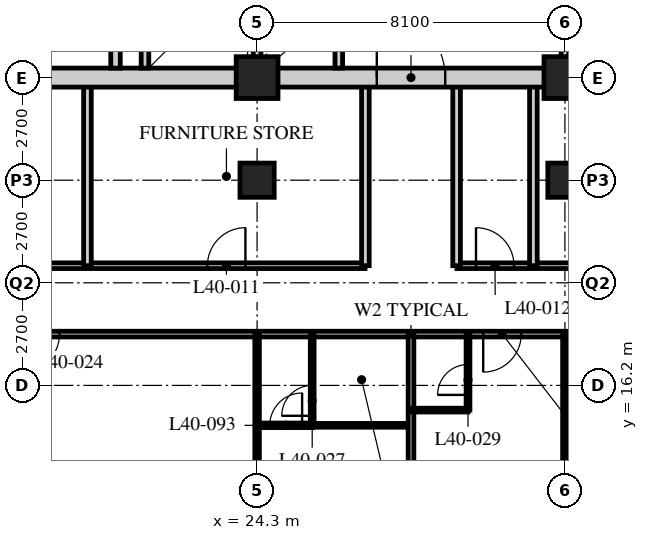
"""IFC4 building model, lengths in metres.
Left out: names, types, materials, properties, quantities, classifications, styles, units other than length and angle.
Written with IfcOpenShell. Run it as: python <this file> out.ifc"""

import sys

from ifc_helpers import new_model, si_unit, direction, frame, frame_2d, origin, origin_2d, place, context, subcontext, project, spatial, rectangle, hollow_rectangle, extrude, element, fill, save


model = new_model("IFC4")
c1 = context("Model", 3, precision=1e-05, world=origin(), true_north=direction((0.0, 1.0)))
c2 = subcontext(c1, "Body", "Model", "MODEL_VIEW")
j1 = project(units=[si_unit("LENGTHUNIT", "METRE"), si_unit("PLANEANGLEUNIT", "RADIAN")], contexts=[c1])
p1 = place(None, origin())
s1 = spatial("IfcSite", under=j1, at=p1, CompositionType="ELEMENT")
p2 = place(p1, origin())
s2 = spatial("IfcBuilding", under=s1, at=p2, CompositionType="ELEMENT")
p3 = place(p2, frame((0.0, 0.0, 154.4)))
s3 = spatial("IfcBuildingStorey", under=s2, at=p3, CompositionType="ELEMENT", Elevation=154.4)
p4 = place(p3, frame((24.3, 21.6, 0.0), z_axis=(0.0, 0.0, 1.0), x_axis=(1.0, 0.0, 0.0)))
e1 = element("IfcColumn", 1, at=p4, inside=s3, PredefinedType="COLUMN", context=c2, shape_type="SweptSolid", body=[
    extrude(hollow_rectangle(XDim=0.9, YDim=0.9, WallThickness=0.1, at=origin_2d()), origin(), (0.0, 0.0, 1.0), 3.4),
])
p5 = place(p3, frame((24.3, 24.3, 0.0), z_axis=(0.0, 0.0, 1.0), x_axis=(1.0, 0.0, 0.0)))
e2 = element("IfcColumn", 2, at=p5, inside=s3, PredefinedType="COLUMN", context=c2, shape_type="SweptSolid", body=[
    extrude(hollow_rectangle(XDim=1.1, YDim=1.1, WallThickness=0.1, at=origin_2d()), origin(), (0.0, 0.0, 1.0), 3.4),
])
p6 = place(p3, frame((32.4, 21.6, 0.0), z_axis=(0.0, 0.0, 1.0), x_axis=(1.0, 0.0, 0.0)))
e3 = element("IfcColumn", 3, at=p6, inside=s3, PredefinedType="COLUMN", context=c2, shape_type="SweptSolid", body=[
    extrude(hollow_rectangle(XDim=0.9, YDim=0.9, WallThickness=0.1, at=origin_2d()), origin(), (0.0, 0.0, 1.0), 3.4),
])
p7 = place(p3, frame((32.4, 24.3, 0.0), z_axis=(0.0, 0.0, 1.0), x_axis=(1.0, 0.0, 0.0)))
e4 = element("IfcColumn", 4, at=p7, inside=s3, PredefinedType="COLUMN", context=c2, shape_type="SweptSolid", body=[
    extrude(hollow_rectangle(XDim=1.1, YDim=1.1, WallThickness=0.1, at=origin_2d()), origin(), (0.0, 0.0, 1.0), 3.4),
])
p8 = place(p3, frame((8.1, 17.55, 0.0), z_axis=(0.0, 0.0, 1.0), x_axis=(1.0, 0.0, 0.0)))
e5 = element("IfcWall", 5, at=p8, inside=s3, PredefinedType="PARTITIONING", context=c2, shape_type="SweptSolid", body=[
    extrude(rectangle(XDim=40.5, YDim=0.15, at=frame_2d((20.25, 0.0))), origin(), (0.0, 0.0, 1.0), 3.15),
])
p9 = place(p8, frame((10.0, 0.0, 0.0)))
e6 = element("IfcOpeningElement", 6, at=p9, cuts=e5, PredefinedType="OPENING", context=c2, shape_type="SweptSolid", body=[
    extrude(rectangle(XDim=1.0, YDim=2.1, at=frame_2d((0.5, 1.05))), frame((0.0, 0.085, 0.0), z_axis=(0.0, -1.0, 0.0), x_axis=(1.0, 0.0, 0.0)), (0.0, 0.0, 1.0), 0.17),
])
p10 = place(p8, frame((22.15, 0.0, 0.0)))
e7 = element("IfcOpeningElement", 7, at=p10, cuts=e5, PredefinedType="OPENING", context=c2, shape_type="SweptSolid", body=[
    extrude(rectangle(XDim=1.0, YDim=2.1, at=frame_2d((0.5, 1.05))), frame((0.0, 0.085, 0.0), z_axis=(0.0, -1.0, 0.0), x_axis=(1.0, 0.0, 0.0)), (0.0, 0.0, 1.0), 0.17),
])
p11 = place(p8, frame((30.8, 0.0, 0.0)))
e8 = element("IfcOpeningElement", 8, at=p11, cuts=e5, PredefinedType="OPENING", context=c2, shape_type="SweptSolid", body=[
    extrude(rectangle(XDim=1.0, YDim=2.1, at=frame_2d((0.5, 1.05))), frame((0.0, 0.085, 0.0), z_axis=(0.0, -1.0, 0.0), x_axis=(1.0, 0.0, 0.0)), (0.0, 0.0, 1.0), 0.17),
])
p12 = place(p8, frame((34.85, 0.0, 0.0)))
e9 = element("IfcOpeningElement", 9, at=p12, cuts=e5, PredefinedType="OPENING", context=c2, shape_type="SweptSolid", body=[
    extrude(rectangle(XDim=1.0, YDim=2.1, at=frame_2d((0.5, 1.05))), frame((0.0, 0.085, 0.0), z_axis=(0.0, -1.0, 0.0), x_axis=(1.0, 0.0, 0.0)), (0.0, 0.0, 1.0), 0.17),
])
p13 = place(p8, frame((1.525, 0.0, 0.0)))
e10 = element("IfcOpeningElement", 10, at=p13, cuts=e5, PredefinedType="OPENING", context=c2, shape_type="SweptSolid", body=[
    extrude(rectangle(XDim=1.0, YDim=2.1, at=frame_2d((0.5, 1.05))), frame((0.0, 0.085, 0.0), z_axis=(0.0, -1.0, 0.0), x_axis=(1.0, 0.0, 0.0)), (0.0, 0.0, 1.0), 0.17),
])
p14 = place(p8, frame((37.975, 0.0, 0.0)))
e11 = element("IfcOpeningElement", 11, at=p14, cuts=e5, PredefinedType="OPENING", context=c2, shape_type="SweptSolid", body=[
    extrude(rectangle(XDim=1.0, YDim=2.1, at=frame_2d((0.5, 1.05))), frame((0.0, 0.085, 0.0), z_axis=(0.0, -1.0, 0.0), x_axis=(1.0, 0.0, 0.0)), (0.0, 0.0, 1.0), 0.17),
])
p15 = place(p3, frame((9.9, 19.35, 0.0), z_axis=(0.0, 0.0, 1.0), x_axis=(1.0, 0.0, 0.0)))
e12 = element("IfcWall", 12, at=p15, inside=s3, PredefinedType="PARTITIONING", context=c2, shape_type="SweptSolid", body=[
    extrude(rectangle(XDim=17.24, YDim=0.15, at=frame_2d((8.62, 0.0))), origin(), (0.0, 0.0, 1.0), 3.15),
])
p16 = place(p15, frame((0.51, 0.0, 0.0)))
e13 = element("IfcOpeningElement", 13, at=p16, cuts=e12, PredefinedType="OPENING", context=c2, shape_type="SweptSolid", body=[
    extrude(rectangle(XDim=1.0, YDim=2.1, at=frame_2d((0.5, 1.05))), frame((0.0, 0.085, 0.0), z_axis=(0.0, -1.0, 0.0), x_axis=(1.0, 0.0, 0.0)), (0.0, 0.0, 1.0), 0.17),
])
p17 = place(p15, frame((3.66, 0.0, 0.0)))
e14 = element("IfcOpeningElement", 14, at=p17, cuts=e12, PredefinedType="OPENING", context=c2, shape_type="SweptSolid", body=[
    extrude(rectangle(XDim=1.0, YDim=2.1, at=frame_2d((0.5, 1.05))), frame((0.0, 0.085, 0.0), z_axis=(0.0, -1.0, 0.0), x_axis=(1.0, 0.0, 0.0)), (0.0, 0.0, 1.0), 0.17),
])
p18 = place(p15, frame((7.618, 0.0, 0.0)))
e15 = element("IfcOpeningElement", 15, at=p18, cuts=e12, PredefinedType="OPENING", context=c2, shape_type="SweptSolid", body=[
    extrude(rectangle(XDim=1.0, YDim=2.1, at=frame_2d((0.5, 1.05))), frame((0.0, 0.085, 0.0), z_axis=(0.0, -1.0, 0.0), x_axis=(1.0, 0.0, 0.0)), (0.0, 0.0, 1.0), 0.17),
])
p19 = place(p15, frame((13.093, 0.0, 0.0)))
e16 = element("IfcOpeningElement", 16, at=p19, cuts=e12, PredefinedType="OPENING", context=c2, shape_type="SweptSolid", body=[
    extrude(rectangle(XDim=1.0, YDim=2.1, at=frame_2d((0.5, 1.05))), frame((0.0, 0.085, 0.0), z_axis=(0.0, -1.0, 0.0), x_axis=(1.0, 0.0, 0.0)), (0.0, 0.0, 1.0), 0.17),
])
p20 = place(p3, frame((29.56, 19.35, 0.0), z_axis=(0.0, 0.0, 1.0), x_axis=(1.0, 0.0, 0.0)))
e17 = element("IfcWall", 17, at=p20, inside=s3, PredefinedType="PARTITIONING", context=c2, shape_type="SweptSolid", body=[
    extrude(rectangle(XDim=17.24, YDim=0.15, at=frame_2d((8.62, 0.0))), origin(), (0.0, 0.0, 1.0), 3.15),
])
p21 = place(p20, frame((0.5, 0.0, 0.0)))
e18 = element("IfcOpeningElement", 18, at=p21, cuts=e17, PredefinedType="OPENING", context=c2, shape_type="SweptSolid", body=[
    extrude(rectangle(XDim=1.0, YDim=2.1, at=frame_2d((0.5, 1.05))), frame((0.0, 0.085, 0.0), z_axis=(0.0, -1.0, 0.0), x_axis=(1.0, 0.0, 0.0)), (0.0, 0.0, 1.0), 0.17),
])
p22 = place(p20, frame((5.975, 0.0, 0.0)))
e19 = element("IfcOpeningElement", 19, at=p22, cuts=e17, PredefinedType="OPENING", context=c2, shape_type="SweptSolid", body=[
    extrude(rectangle(XDim=1.0, YDim=2.1, at=frame_2d((0.5, 1.05))), frame((0.0, 0.085, 0.0), z_axis=(0.0, -1.0, 0.0), x_axis=(1.0, 0.0, 0.0)), (0.0, 0.0, 1.0), 0.17),
])
p23 = place(p20, frame((12.258, 0.0, 0.0)))
e20 = element("IfcOpeningElement", 20, at=p23, cuts=e17, PredefinedType="OPENING", context=c2, shape_type="SweptSolid", body=[
    extrude(rectangle(XDim=1.0, YDim=2.1, at=frame_2d((0.5, 1.05))), frame((0.0, 0.085, 0.0), z_axis=(0.0, -1.0, 0.0), x_axis=(1.0, 0.0, 0.0)), (0.0, 0.0, 1.0), 0.17),
])
p24 = place(p20, frame((15.408, 0.0, 0.0)))
e21 = element("IfcOpeningElement", 21, at=p24, cuts=e17, PredefinedType="OPENING", context=c2, shape_type="SweptSolid", body=[
    extrude(rectangle(XDim=1.0, YDim=2.1, at=frame_2d((0.5, 1.05))), frame((0.0, 0.085, 0.0), z_axis=(0.0, -1.0, 0.0), x_axis=(1.0, 0.0, 0.0)), (0.0, 0.0, 1.0), 0.17),
])
for number, where, z_axis, x_axis in (
    (22, (19.836, 19.35, 0.0), (0.0, 0.0, 1.0), (0.0, 1.0, 0.0)),
    (23, (31.57, 19.35, 0.0), (0.0, 0.0, 1.0), (0.0, 1.0, 0.0)),
    (24, (27.15, 19.35, 0.0), (0.0, 0.0, 1.0), (0.0, 1.0, 0.0)),
    (25, (29.55, 19.35, 0.0), (0.0, 0.0, 1.0), (0.0, 1.0, 0.0)),
):
    element("IfcWall", number, at=place(p3, frame(where, z_axis=z_axis, x_axis=x_axis)), inside=s3, PredefinedType="SOLIDWALL", context=c2, shape_type="SweptSolid", body=[
        extrude(rectangle(XDim=4.95, YDim=0.2, at=frame_2d((2.475, 0.0))), origin(), (0.0, 0.0, 1.0), 3.15),
    ])
p25 = place(p3, frame((25.75, 15.15, 0.0), z_axis=(0.0, 0.0, 1.0), x_axis=(1.0, 0.0, 0.0)))
e26 = element("IfcWall", 26, at=p25, inside=s3, PredefinedType="PARTITIONING", context=c2, shape_type="SweptSolid", body=[
    extrude(rectangle(XDim=2.6, YDim=0.1, at=frame_2d((1.3, 0.0))), origin(), (0.0, 0.0, 1.0), 3.15),
])
p26 = place(p3, frame((25.75, 17.55, 0.0), z_axis=(0.0, 0.0, 1.0), x_axis=(0.0, -1.0, 0.0)))
e27 = element("IfcWall", 27, at=p26, inside=s3, PredefinedType="PARTITIONING", context=c2, shape_type="SweptSolid", body=[
    extrude(rectangle(XDim=2.4, YDim=0.1, at=frame_2d((1.2, 0.0))), origin(), (0.0, 0.0, 1.0), 3.15),
])
p27 = place(p26, frame((1.35, 0.0, 0.0)))
e28 = element("IfcOpeningElement", 28, at=p27, cuts=e27, PredefinedType="OPENING", context=c2, shape_type="SweptSolid", body=[
    extrude(rectangle(XDim=0.8, YDim=2.1, at=frame_2d((0.4, 1.05))), frame((0.0, 0.06, 0.0), z_axis=(0.0, -1.0, 0.0), x_axis=(1.0, 0.0, 0.0)), (0.0, 0.0, 1.0), 0.12),
])
p28 = place(p3, frame((24.3, 17.55, 0.0), z_axis=(0.0, 0.0, 1.0), x_axis=(0.0, -1.0, 0.0)))
e29 = element("IfcWall", 29, at=p28, inside=s3, PredefinedType="PARTITIONING", context=c2, shape_type="SweptSolid", body=[
    extrude(rectangle(XDim=11.85, YDim=0.12, at=frame_2d((5.925, 0.0))), origin(), (0.0, 0.0, 1.0), 2.15),
])
p29 = place(p28, frame((6.85, 0.0, 0.0)))
e30 = element("IfcOpeningElement", 30, at=p29, cuts=e29, PredefinedType="OPENING", context=c2, shape_type="SweptSolid", body=[
    extrude(rectangle(XDim=0.85, YDim=2.1, at=frame_2d((0.425, 1.05))), frame((0.0, 0.07, 0.0), z_axis=(0.0, -1.0, 0.0), x_axis=(1.0, 0.0, 0.0)), (0.0, 0.0, 1.0), 0.14),
])
p30 = place(p3, frame((28.35, 17.55, 0.0), z_axis=(0.0, 0.0, 1.0), x_axis=(0.0, -1.0, 0.0)))
e31 = element("IfcWall", 31, at=p30, inside=s3, PredefinedType="PARTITIONING", context=c2, shape_type="SweptSolid", body=[
    extrude(rectangle(XDim=11.85, YDim=0.15, at=frame_2d((5.925, 0.0))), origin(), (0.0, 0.0, 1.0), 3.15),
])
p31 = place(p3, frame((28.35, 15.55, 0.0), z_axis=(0.0, 0.0, 1.0), x_axis=(1.0, 0.0, 0.0)))
e32 = element("IfcWall", 32, at=p31, inside=s3, PredefinedType="PARTITIONING", context=c2, shape_type="SweptSolid", body=[
    extrude(rectangle(XDim=1.5, YDim=0.1, at=frame_2d((0.75, 0.0))), origin(), (0.0, 0.0, 1.0), 3.15),
])
p32 = place(p3, frame((29.85, 17.55, 0.0), z_axis=(0.0, 0.0, 1.0), x_axis=(0.0, -1.0, 0.0)))
e33 = element("IfcWall", 33, at=p32, inside=s3, PredefinedType="PARTITIONING", context=c2, shape_type="SweptSolid", body=[
    extrude(rectangle(XDim=2.0, YDim=0.1, at=frame_2d((1.0, 0.0))), origin(), (0.0, 0.0, 1.0), 3.15),
])
p33 = place(p32, frame((0.8, 0.0, 0.0)))
e34 = element("IfcOpeningElement", 34, at=p33, cuts=e33, PredefinedType="OPENING", context=c2, shape_type="SweptSolid", body=[
    extrude(rectangle(XDim=0.8, YDim=2.1, at=frame_2d((0.4, 1.05))), frame((0.0, 0.06, 0.0), z_axis=(0.0, -1.0, 0.0), x_axis=(1.0, 0.0, 0.0)), (0.0, 0.0, 1.0), 0.12),
])
p34 = place(p3, frame((32.4, 17.55, 0.0), z_axis=(0.0, 0.0, 1.0), x_axis=(0.0, -1.0, 0.0)))
e35 = element("IfcWall", 35, at=p34, inside=s3, PredefinedType="PARTITIONING", context=c2, shape_type="SweptSolid", body=[
    extrude(rectangle(XDim=11.85, YDim=0.12, at=frame_2d((5.925, 0.0))), origin(), (0.0, 0.0, 1.0), 2.15),
])
p35 = place(p34, frame((6.85, 0.0, 0.0)))
e36 = element("IfcOpeningElement", 36, at=p35, cuts=e35, PredefinedType="OPENING", context=c2, shape_type="SweptSolid", body=[
    extrude(rectangle(XDim=0.85, YDim=2.1, at=frame_2d((0.425, 1.05))), frame((0.0, 0.07, 0.0), z_axis=(0.0, -1.0, 0.0), x_axis=(1.0, 0.0, 0.0)), (0.0, 0.0, 1.0), 0.14),
])
p36 = place(p3, frame((25.76, 15.15, 0.0), z_axis=(0.0, 0.0, 1.0), x_axis=(-1.0, 0.0, 0.0)))
e37 = element("IfcWall", 37, at=p36, inside=s3, PredefinedType="PARTITIONING", context=c2, shape_type="SweptSolid", body=[
    extrude(rectangle(XDim=1.46, YDim=0.12, at=frame_2d((0.73, 0.0))), origin(), (0.0, 0.0, 1.0), 3.15),
])
p37 = place(p36, frame((0.275, 0.0, 0.0)))
e38 = element("IfcOpeningElement", 38, at=p37, cuts=e37, PredefinedType="OPENING", context=c2, shape_type="SweptSolid", body=[
    extrude(rectangle(XDim=0.85, YDim=2.1, at=frame_2d((0.425, 1.05))), frame((0.0, 0.07, 0.0), z_axis=(0.0, -1.0, 0.0), x_axis=(1.0, 0.0, 0.0)), (0.0, 0.0, 1.0), 0.14),
])
p38 = place(p3, frame((33.86, 15.15, 0.0), z_axis=(0.0, 0.0, 1.0), x_axis=(-1.0, 0.0, 0.0)))
e39 = element("IfcWall", 39, at=p38, inside=s3, PredefinedType="PARTITIONING", context=c2, shape_type="SweptSolid", body=[
    extrude(rectangle(XDim=1.46, YDim=0.12, at=frame_2d((0.73, 0.0))), origin(), (0.0, 0.0, 1.0), 3.15),
])
p39 = place(p38, frame((0.275, 0.0, 0.0)))
e40 = element("IfcOpeningElement", 40, at=p39, cuts=e39, PredefinedType="OPENING", context=c2, shape_type="SweptSolid", body=[
    extrude(rectangle(XDim=0.85, YDim=2.1, at=frame_2d((0.425, 1.05))), frame((0.0, 0.07, 0.0), z_axis=(0.0, -1.0, 0.0), x_axis=(1.0, 0.0, 0.0)), (0.0, 0.0, 1.0), 0.14),
])
p40 = place(p3, frame((15.95, 24.3, 0.0), z_axis=(0.0, 0.0, 1.0), x_axis=(1.0, 0.0, 0.0)))
e41 = element("IfcWall", 41, at=p40, inside=s3, PredefinedType="SOLIDWALL", context=c2, shape_type="SweptSolid", body=[
    extrude(rectangle(XDim=8.35, YDim=0.5, at=frame_2d((4.175, 0.0))), origin(), (0.0, 0.0, 1.0), 2.38),
])
p41 = place(p3, frame((24.3, 24.3, 0.0), z_axis=(0.0, 0.0, 1.0), x_axis=(1.0, 0.0, 0.0)))
e42 = element("IfcWall", 42, at=p41, inside=s3, PredefinedType="SOLIDWALL", context=c2, shape_type="SweptSolid", body=[
    extrude(rectangle(XDim=8.1, YDim=0.5, at=frame_2d((4.05, 0.0))), origin(), (0.0, 0.0, 1.0), 2.5),
])
p42 = place(p41, frame((3.15, 0.0, 0.0)))
e43 = element("IfcOpeningElement", 43, at=p42, cuts=e42, PredefinedType="OPENING", context=c2, shape_type="SweptSolid", body=[
    extrude(rectangle(XDim=1.8, YDim=2.4, at=frame_2d((0.9, 1.2))), frame((0.0, 0.26, 0.0), z_axis=(0.0, -1.0, 0.0), x_axis=(1.0, 0.0, 0.0)), (0.0, 0.0, 1.0), 0.52),
])
p43 = place(p3, frame((32.4, 24.3, 0.0), z_axis=(0.0, 0.0, 1.0), x_axis=(1.0, 0.0, 0.0)))
e44 = element("IfcWall", 44, at=p43, inside=s3, PredefinedType="SOLIDWALL", context=c2, shape_type="SweptSolid", body=[
    extrude(rectangle(XDim=8.35, YDim=0.5, at=frame_2d((4.175, 0.0))), origin(), (0.0, 0.0, 1.0), 2.38),
])
p44 = place(p3, frame((24.3, 24.55, 0.0), z_axis=(0.0, 0.0, 1.0), x_axis=(0.0, 1.0, 0.0)))
e45 = element("IfcWall", 45, at=p44, inside=s3, PredefinedType="SOLIDWALL", context=c2, shape_type="SweptSolid", body=[
    extrude(rectangle(XDim=7.75, YDim=0.2, at=frame_2d((3.875, 0.0))), origin(), (0.0, 0.0, 1.0), 2.388),
])
p45 = place(p44, frame((4.6, 0.0, 0.0)))
e46 = element("IfcOpeningElement", 46, at=p45, cuts=e45, PredefinedType="OPENING", context=c2, shape_type="SweptSolid", body=[
    extrude(rectangle(XDim=1.2, YDim=2.1, at=frame_2d((0.6, 1.05))), frame((0.0, 0.11, 0.0), z_axis=(0.0, -1.0, 0.0), x_axis=(1.0, 0.0, 0.0)), (0.0, 0.0, 1.0), 0.22),
])
p46 = place(p3, frame((20.575, 24.55, 0.0), z_axis=(0.0, 0.0, 1.0), x_axis=(0.0, 1.0, 0.0)))
e47 = element("IfcWall", 47, at=p46, inside=s3, PredefinedType="SOLIDWALL", context=c2, shape_type="SweptSolid", body=[
    extrude(rectangle(XDim=7.75, YDim=0.25, at=frame_2d((3.875, 0.0))), origin(), (0.0, 0.0, 1.0), 3.15),
])
p47 = place(p46, frame((6.2, 0.0, 0.0)))
e48 = element("IfcOpeningElement", 48, at=p47, cuts=e47, PredefinedType="OPENING", context=c2, shape_type="SweptSolid", body=[
    extrude(rectangle(XDim=1.2, YDim=2.1, at=frame_2d((0.6, 1.05))), frame((0.0, 0.135, 0.0), z_axis=(0.0, -1.0, 0.0), x_axis=(1.0, 0.0, 0.0)), (0.0, 0.0, 1.0), 0.27),
])
p48 = place(p3, frame((21.35, 24.55, 0.0), z_axis=(0.0, 0.0, 1.0), x_axis=(0.0, 1.0, 0.0)))
e49 = element("IfcWall", 49, at=p48, inside=s3, PredefinedType="SOLIDWALL", context=c2, shape_type="SweptSolid", body=[
    extrude(rectangle(XDim=2.6, YDim=0.2, at=frame_2d((1.3, 0.0))), origin(), (0.0, 0.0, 1.0), 3.15),
])
p49 = place(p3, frame((26.45, 24.55, 0.0), z_axis=(0.0, 0.0, 1.0), x_axis=(0.0, 1.0, 0.0)))
e50 = element("IfcWall", 50, at=p49, inside=s3, PredefinedType="SOLIDWALL", context=c2, shape_type="SweptSolid", body=[
    extrude(rectangle(XDim=1.6, YDim=0.2, at=frame_2d((0.8, 0.0))), origin(), (0.0, 0.0, 1.0), 3.15),
])
p50 = place(p3, frame((32.4, 24.55, 0.0), z_axis=(0.0, 0.0, 1.0), x_axis=(0.0, 1.0, 0.0)))
e51 = element("IfcWall", 51, at=p50, inside=s3, PredefinedType="PARTITIONING", context=c2, shape_type="SweptSolid", body=[
    extrude(rectangle(XDim=7.75, YDim=0.2, at=frame_2d((3.875, 0.0))), origin(), (0.0, 0.0, 1.0), 2.388),
])
p51 = place(p50, frame((0.65, 0.0, 0.0)))
e52 = element("IfcOpeningElement", 52, at=p51, cuts=e51, PredefinedType="OPENING", context=c2, shape_type="SweptSolid", body=[
    extrude(rectangle(XDim=0.9, YDim=2.1, at=frame_2d((0.45, 1.05))), frame((0.0, 0.11, 0.0), z_axis=(0.0, -1.0, 0.0), x_axis=(1.0, 0.0, 0.0)), (0.0, 0.0, 1.0), 0.22),
])
p52 = place(p50, frame((2.15, 0.0, 0.0)))
e53 = element("IfcOpeningElement", 53, at=p52, cuts=e51, PredefinedType="OPENING", context=c2, shape_type="SweptSolid", body=[
    extrude(rectangle(XDim=0.9, YDim=2.1, at=frame_2d((0.45, 1.05))), frame((0.0, 0.11, 0.0), z_axis=(0.0, -1.0, 0.0), x_axis=(1.0, 0.0, 0.0)), (0.0, 0.0, 1.0), 0.22),
])
p53 = place(p50, frame((3.8, 0.0, 0.0)))
e54 = element("IfcOpeningElement", 54, at=p53, cuts=e51, PredefinedType="OPENING", context=c2, shape_type="SweptSolid", body=[
    extrude(rectangle(XDim=1.0, YDim=2.1, at=frame_2d((0.5, 1.05))), frame((0.0, 0.11, 0.0), z_axis=(0.0, -1.0, 0.0), x_axis=(1.0, 0.0, 0.0)), (0.0, 0.0, 1.0), 0.22),
])
p54 = place(p50, frame((6.05, 0.0, 0.0)))
e55 = element("IfcOpeningElement", 55, at=p54, cuts=e51, PredefinedType="OPENING", context=c2, shape_type="SweptSolid", body=[
    extrude(rectangle(XDim=0.9, YDim=2.1, at=frame_2d((0.45, 1.05))), frame((0.0, 0.11, 0.0), z_axis=(0.0, -1.0, 0.0), x_axis=(1.0, 0.0, 0.0)), (0.0, 0.0, 1.0), 0.22),
])
p55 = place(p19, origin())
e56 = element("IfcDoor", 56, at=p55, inside=s3, OperationType="SINGLE_SWING_RIGHT", PredefinedType="DOOR", context=c2, shape_type="SweptSolid", body=[
    extrude(rectangle(XDim=1.0, YDim=2.1, at=frame_2d((0.5, 1.05))), frame((0.0, 0.025, 0.0), z_axis=(0.0, -1.0, 0.0), x_axis=(1.0, 0.0, 0.0)), (0.0, 0.0, 1.0), 0.05),
])
fill(e16, e56)
p56 = place(p21, origin())
e57 = element("IfcDoor", 57, at=p56, inside=s3, OperationType="SINGLE_SWING_LEFT", PredefinedType="DOOR", context=c2, shape_type="SweptSolid", body=[
    extrude(rectangle(XDim=1.0, YDim=2.1, at=frame_2d((0.5, 1.05))), frame((0.0, 0.025, 0.0), z_axis=(0.0, -1.0, 0.0), x_axis=(1.0, 0.0, 0.0)), (0.0, 0.0, 1.0), 0.05),
])
fill(e18, e57)
p57 = place(p9, origin())
e58 = element("IfcDoor", 58, at=p57, inside=s3, OperationType="SINGLE_SWING_RIGHT", PredefinedType="DOOR", context=c2, shape_type="SweptSolid", body=[
    extrude(rectangle(XDim=1.0, YDim=2.1, at=frame_2d((0.5, 1.05))), frame((0.0, 0.025, 0.0), z_axis=(0.0, -1.0, 0.0), x_axis=(1.0, 0.0, 0.0)), (0.0, 0.0, 1.0), 0.05),
])
fill(e6, e58)
p58 = place(p27, origin())
e59 = element("IfcDoor", 59, at=p58, inside=s3, OperationType="SINGLE_SWING_LEFT", PredefinedType="DOOR", context=c2, shape_type="SweptSolid", body=[
    extrude(rectangle(XDim=0.8, YDim=2.1, at=frame_2d((0.4, 1.05))), frame((0.0, 0.025, 0.0), z_axis=(0.0, -1.0, 0.0), x_axis=(1.0, 0.0, 0.0)), (0.0, 0.0, 1.0), 0.05),
])
fill(e28, e59)
p59 = place(p33, origin())
e60 = element("IfcDoor", 60, at=p59, inside=s3, OperationType="SINGLE_SWING_LEFT", PredefinedType="DOOR", context=c2, shape_type="SweptSolid", body=[
    extrude(rectangle(XDim=0.8, YDim=2.1, at=frame_2d((0.4, 1.05))), frame((0.0, 0.025, 0.0), z_axis=(0.0, -1.0, 0.0), x_axis=(1.0, 0.0, 0.0)), (0.0, 0.0, 1.0), 0.05),
])
fill(e34, e60)
p60 = place(p10, origin())
e61 = element("IfcDoor", 61, at=p60, inside=s3, OperationType="SINGLE_SWING_RIGHT", PredefinedType="DOOR", context=c2, shape_type="SweptSolid", body=[
    extrude(rectangle(XDim=1.0, YDim=2.1, at=frame_2d((0.5, 1.05))), frame((0.0, 0.025, 0.0), z_axis=(0.0, -1.0, 0.0), x_axis=(1.0, 0.0, 0.0)), (0.0, 0.0, 1.0), 0.05),
])
fill(e7, e61)
p61 = place(p37, origin())
e62 = element("IfcDoor", 62, at=p61, inside=s3, OperationType="SINGLE_SWING_RIGHT", PredefinedType="DOOR", context=c2, shape_type="SweptSolid", body=[
    extrude(rectangle(XDim=0.85, YDim=2.1, at=frame_2d((0.425, 1.05))), frame((0.0, 0.025, 0.0), z_axis=(0.0, -1.0, 0.0), x_axis=(1.0, 0.0, 0.0)), (0.0, 0.0, 1.0), 0.05),
])
fill(e38, e62)
p62 = place(p42, origin())
e63 = element("IfcDoor", 63, at=p62, inside=s3, OperationType="DOUBLE_DOOR_SINGLE_SWING", PredefinedType="DOOR", context=c2, shape_type="SweptSolid", body=[
    extrude(rectangle(XDim=1.8, YDim=2.4, at=frame_2d((0.9, 1.2))), frame((0.0, 0.025, 0.0), z_axis=(0.0, -1.0, 0.0), x_axis=(1.0, 0.0, 0.0)), (0.0, 0.0, 1.0), 0.05),
])
fill(e43, e63)
save(model, sys.argv[1])
